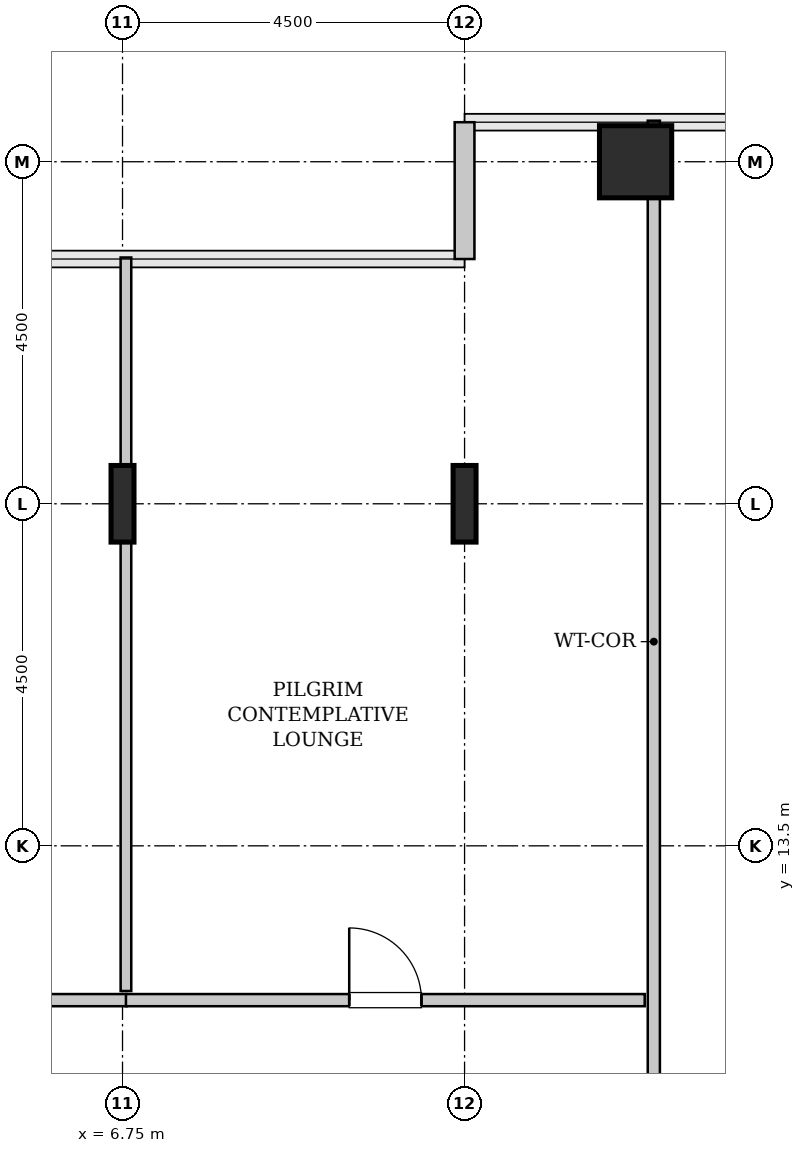
"""IFC4 building model, lengths in metres.
Left out: names, types, materials, properties, quantities, classifications, styles, units other than length and angle.
Written with IfcOpenShell. Run it as: python <this file> out.ifc"""

import sys

from ifc_helpers import new_model, si_unit, direction, frame, frame_2d, origin, origin_2d, place, context, subcontext, project, spatial, rectangle, hollow_rectangle, i_section, extrude, source, transform, mapped, element, fill, save


model = new_model("IFC4")
c1 = context("Model", 3, precision=1e-05, world=origin(), true_north=direction((0.0, 1.0)))
c2 = subcontext(c1, "Body", "Model", "MODEL_VIEW")
j1 = project(units=[si_unit("LENGTHUNIT", "METRE"), si_unit("PLANEANGLEUNIT", "RADIAN")], contexts=[c1])
p1 = place(None, origin())
s1 = spatial("IfcSite", under=j1, at=p1, CompositionType="ELEMENT")
p2 = place(p1, origin())
s2 = spatial("IfcBuilding", under=s1, at=p2, CompositionType="ELEMENT")
p3 = place(p2, frame((0.0, 0.0, 48.2)))
s3 = spatial("IfcBuildingStorey", under=s2, at=p3, CompositionType="ELEMENT", Elevation=48.2)
m1 = source(origin(), c2, "Body", "SweptSolid", [
    extrude(i_section(OverallWidth=0.302, OverallDepth=1.008, WebThickness=0.021, FlangeThickness=0.04, FilletRadius=0.03, at=origin_2d()), origin(), (0.0, 0.0, 1.0), 3.8),
])
for number, where, z_axis, x_axis in (
    (1, (6.75, 18.0, 0.0), (0.0, 0.0, 1.0), (1.0, 0.0, 0.0)),
    (2, (11.25, 18.0, 0.0), (0.0, 0.0, 1.0), (1.0, 0.0, 0.0)),
):
    element("IfcColumn", number, at=place(p3, frame(where, z_axis=z_axis, x_axis=x_axis)), inside=s3, PredefinedType="COLUMN", context=c2, shape_type="MappedRepresentation", body=[
        mapped(m1, transform((0.0, 0.0, 0.0), x_axis=(1.0, 0.0, 0.0), y_axis=(0.0, 1.0, 0.0), z_axis=(0.0, 0.0, 1.0), scale=1.0)),
    ])
m2 = source(origin(), c2, "Body", "SweptSolid", [
    extrude(hollow_rectangle(XDim=0.95, YDim=0.95, WallThickness=0.045, InnerFilletRadius=0.045, OuterFilletRadius=0.09, at=origin_2d()), origin(), (0.0, 0.0, 1.0), 3.8),
])
p4 = place(p3, frame((13.5, 22.5, 0.0), z_axis=(0.0, 0.0, 1.0), x_axis=(1.0, 0.0, 0.0)))
e3 = element("IfcColumn", 3, at=p4, inside=s3, PredefinedType="COLUMN", context=c2, shape_type="MappedRepresentation", body=[
    mapped(m2, transform((0.0, 0.0, 0.0), x_axis=(1.0, 0.0, 0.0), y_axis=(0.0, 1.0, 0.0), z_axis=(0.0, 0.0, 1.0), scale=1.0)),
])
m3 = source(origin(), c2, "Body", "SweptSolid", [
    extrude(rectangle(XDim=1.8, YDim=0.26, at=frame_2d((0.9, 0.0))), origin(), (0.0, 0.0, 1.0), 3.55),
])
p5 = place(p3, frame((11.25, 23.02, 0.0), z_axis=(0.0, 0.0, 1.0), x_axis=(0.0, -1.0, 0.0)))
e4 = element("IfcWall", 4, at=p5, inside=s3, PredefinedType="SOLIDWALL", context=c2, shape_type="MappedRepresentation", body=[
    mapped(m3, transform((0.0, 0.0, 0.0), x_axis=(1.0, 0.0, 0.0), y_axis=(0.0, 1.0, 0.0), z_axis=(0.0, 0.0, 1.0), scale=1.0)),
])
m4 = source(origin(), c2, "Body", "SweptSolid", [
    extrude(rectangle(XDim=16.735, YDim=0.16, at=frame_2d((8.368, 0.0))), origin(), (0.0, 0.0, 1.0), 3.535),
])
p6 = place(p3, frame((13.74, 6.305, 0.0), z_axis=(0.0, 0.0, 1.0), x_axis=(0.0, 1.0, 0.0)))
e5 = element("IfcWall", 5, at=p6, inside=s3, PredefinedType="PARTITIONING", context=c2, shape_type="MappedRepresentation", body=[
    mapped(m4, transform((0.0, 0.0, 0.0), x_axis=(1.0, 0.0, 0.0), y_axis=(0.0, 1.0, 0.0), z_axis=(0.0, 0.0, 1.0), scale=1.0)),
])
p7 = place(p6, frame((2.127, 0.0, 0.0)))
e6 = element("IfcOpeningElement", 6, at=p7, cuts=e5, PredefinedType="OPENING", context=c2, shape_type="SweptSolid", body=[
    extrude(rectangle(XDim=0.95, YDim=2.1, at=frame_2d((0.475, 1.05))), frame((0.0, 0.09, 0.0), z_axis=(0.0, -1.0, 0.0), x_axis=(1.0, 0.0, 0.0)), (0.0, 0.0, 1.0), 0.18),
])
m5 = source(origin(), c2, "Body", "SweptSolid", [
    extrude(rectangle(XDim=5.805, YDim=0.16, at=frame_2d((2.902, 0.0))), origin(), (0.0, 0.0, 1.0), 3.535),
])
p8 = place(p3, frame((1.0, 11.47, 0.0), z_axis=(0.0, 0.0, 1.0), x_axis=(1.0, 0.0, 0.0)))
e7 = element("IfcWall", 7, at=p8, inside=s3, PredefinedType="PARTITIONING", context=c2, shape_type="MappedRepresentation", body=[
    mapped(m5, transform((0.0, 0.0, 0.0), x_axis=(1.0, 0.0, 0.0), y_axis=(0.0, 1.0, 0.0), z_axis=(0.0, 0.0, 1.0), scale=1.0)),
])
p9 = place(p8, frame((2.427, 0.0, 0.0)))
e8 = element("IfcOpeningElement", 8, at=p9, cuts=e7, PredefinedType="OPENING", context=c2, shape_type="SweptSolid", body=[
    extrude(rectangle(XDim=0.95, YDim=2.1, at=frame_2d((0.475, 1.05))), frame((0.0, 0.09, 0.0), z_axis=(0.0, -1.0, 0.0), x_axis=(1.0, 0.0, 0.0)), (0.0, 0.0, 1.0), 0.18),
])
m6 = source(origin(), c2, "Body", "SweptSolid", [
    extrude(rectangle(XDim=9.65, YDim=0.14, at=frame_2d((4.825, 0.0))), origin(), (0.0, 0.0, 1.0), 3.535),
])
p10 = place(p3, frame((6.795, 11.59, 0.0), z_axis=(0.0, 0.0, 1.0), x_axis=(0.0, 1.0, 0.0)))
e9 = element("IfcWall", 9, at=p10, inside=s3, PredefinedType="PARTITIONING", context=c2, shape_type="MappedRepresentation", body=[
    mapped(m6, transform((0.0, 0.0, 0.0), x_axis=(1.0, 0.0, 0.0), y_axis=(0.0, 1.0, 0.0), z_axis=(0.0, 0.0, 1.0), scale=1.0)),
])
m7 = source(origin(), c2, "Body", "SweptSolid", [
    extrude(rectangle(XDim=6.825, YDim=0.16, at=frame_2d((3.413, 0.0))), origin(), (0.0, 0.0, 1.0), 3.535),
])
p11 = place(p3, frame((6.795, 11.47, 0.0), z_axis=(0.0, 0.0, 1.0), x_axis=(1.0, 0.0, 0.0)))
e10 = element("IfcWall", 10, at=p11, inside=s3, PredefinedType="PARTITIONING", context=c2, shape_type="MappedRepresentation", body=[
    mapped(m7, transform((0.0, 0.0, 0.0), x_axis=(1.0, 0.0, 0.0), y_axis=(0.0, 1.0, 0.0), z_axis=(0.0, 0.0, 1.0), scale=1.0)),
])
p12 = place(p11, frame((2.938, 0.0, 0.0)))
e11 = element("IfcOpeningElement", 11, at=p12, cuts=e10, PredefinedType="OPENING", context=c2, shape_type="SweptSolid", body=[
    extrude(rectangle(XDim=0.95, YDim=2.1, at=frame_2d((0.475, 1.05))), frame((0.0, 0.09, 0.0), z_axis=(0.0, -1.0, 0.0), x_axis=(1.0, 0.0, 0.0)), (0.0, 0.0, 1.0), 0.18),
])
m8 = source(origin(), c2, "Body", "SweptSolid", [
    extrude(rectangle(XDim=0.95, YDim=2.1, at=frame_2d((0.475, 1.05))), frame((0.0, 0.025, 0.0), z_axis=(0.0, -1.0, 0.0), x_axis=(1.0, 0.0, 0.0)), (0.0, 0.0, 1.0), 0.05),
])
p13 = place(p12, origin())
e12 = element("IfcDoor", 12, at=p13, inside=s3, OperationType="SINGLE_SWING_LEFT", PredefinedType="DOOR", context=c2, shape_type="MappedRepresentation", body=[
    mapped(m8, transform((0.0, 0.0, 0.0), x_axis=(1.0, 0.0, 0.0), y_axis=(0.0, 1.0, 0.0), z_axis=(0.0, 0.0, 1.0), scale=1.0)),
])
fill(e11, e12)
save(model, sys.argv[1])
